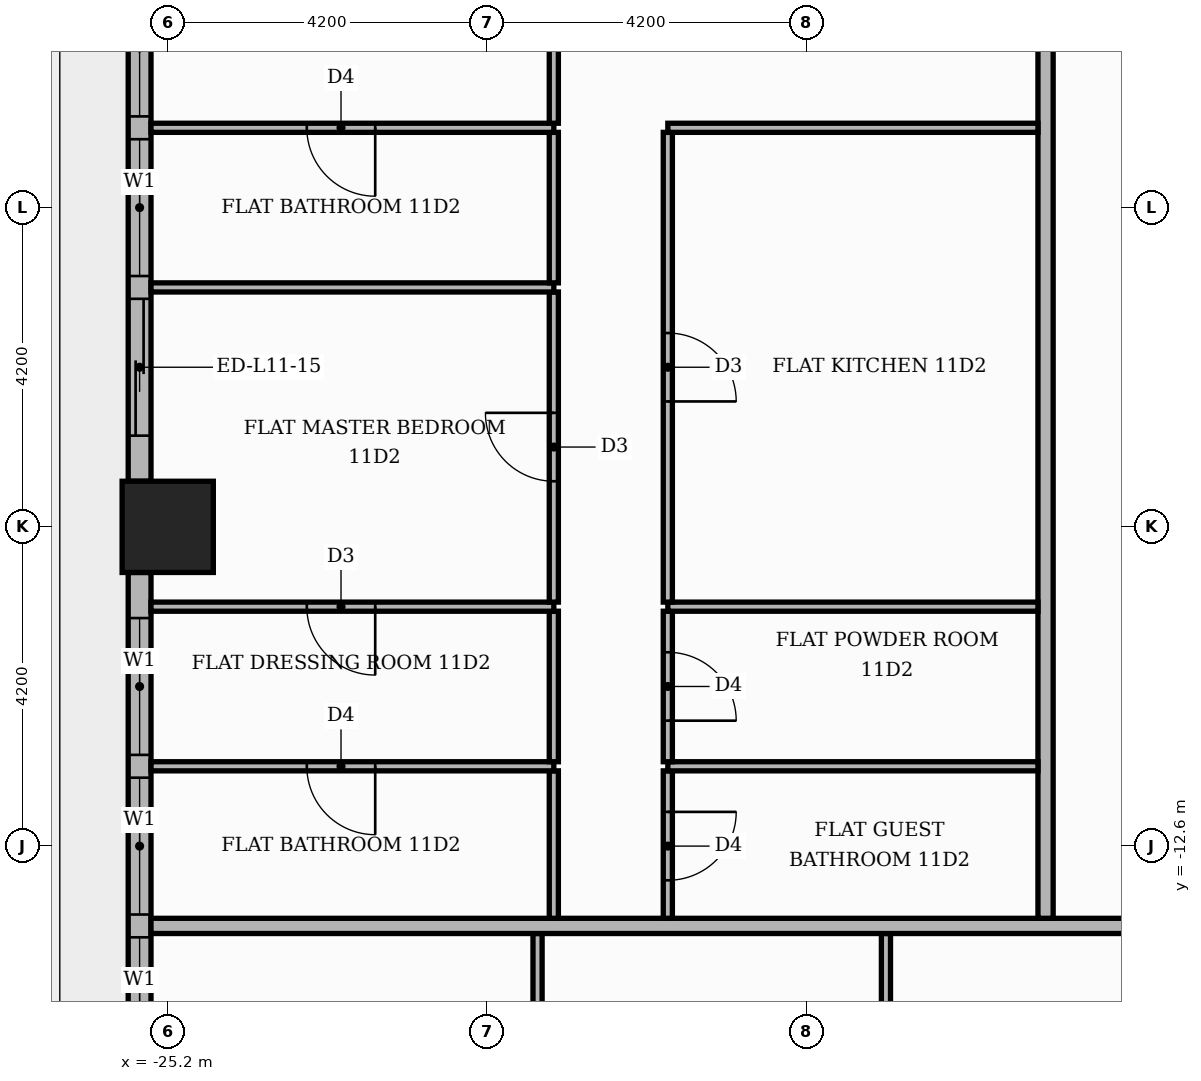
"""IFC4 building model, lengths in metres.
Left out: names, types, materials, properties, quantities, classifications, styles, units other than length and angle.
Written with IfcOpenShell. Run it as: python <this file> out.ifc"""

import sys

from ifc_helpers import new_model, si_unit, direction, frame, frame_2d, origin, origin_2d, place, context, subcontext, project, spatial, rectangle, extrude, element, fill, save


model = new_model("IFC4")
c1 = context("Model", 3, precision=1e-05, world=origin(), true_north=direction((0.0, 1.0)))
c2 = subcontext(c1, "Body", "Model", "MODEL_VIEW")
j1 = project(units=[si_unit("LENGTHUNIT", "METRE"), si_unit("PLANEANGLEUNIT", "RADIAN")], contexts=[c1])
p1 = place(None, origin())
s1 = spatial("IfcSite", under=j1, at=p1, CompositionType="ELEMENT")
p2 = place(p1, origin())
s2 = spatial("IfcBuilding", under=s1, at=p2, CompositionType="ELEMENT")
p3 = place(p2, frame((0.0, 0.0, 50.4)))
s3 = spatial("IfcBuildingStorey", under=s2, at=p3, CompositionType="ELEMENT", Elevation=50.4)
p4 = place(p3, frame((-25.2, -8.4, 0.0), z_axis=(0.0, 0.0, 1.0), x_axis=(1.0, 0.0, 0.0)))
e1 = element("IfcColumn", 1, at=p4, inside=s3, PredefinedType="COLUMN", context=c2, shape_type="SweptSolid", body=[
    extrude(rectangle(XDim=1.2, YDim=1.2, at=origin_2d()), origin(), (0.0, 0.0, 1.0), 3.9),
])
p5 = place(p3, frame((-25.57, -0.6, 0.0), z_axis=(0.0, 0.0, 1.0), x_axis=(0.0, -1.0, 0.0)))
e2 = element("IfcWall", 2, at=p5, inside=s3, PredefinedType="STANDARD", context=c2, shape_type="SweptSolid", body=[
    extrude(rectangle(XDim=7.2, YDim=0.3, at=frame_2d((3.6, 0.0))), origin(), (0.0, 0.0, 1.0), 3.48),
])
p6 = place(p5, frame((0.6, 0.0, 0.9)))
e3 = element("IfcOpeningElement", 3, at=p6, cuts=e2, PredefinedType="OPENING", context=c2, shape_type="SweptSolid", body=[
    extrude(rectangle(XDim=1.8, YDim=2.1, at=frame_2d((0.9, 1.05))), frame((0.0, 0.16, 0.0), z_axis=(0.0, -1.0, 0.0), x_axis=(1.0, 0.0, 0.0)), (0.0, 0.0, 1.0), 0.32),
])
p7 = place(p5, frame((2.7, 0.0, 0.9)))
e4 = element("IfcOpeningElement", 4, at=p7, cuts=e2, PredefinedType="OPENING", context=c2, shape_type="SweptSolid", body=[
    extrude(rectangle(XDim=1.8, YDim=2.1, at=frame_2d((0.9, 1.05))), frame((0.0, 0.16, 0.0), z_axis=(0.0, -1.0, 0.0), x_axis=(1.0, 0.0, 0.0)), (0.0, 0.0, 1.0), 0.32),
])
p8 = place(p5, frame((4.8, 0.0, 0.0)))
e5 = element("IfcOpeningElement", 5, at=p8, cuts=e2, PredefinedType="OPENING", context=c2, shape_type="SweptSolid", body=[
    extrude(rectangle(XDim=1.8, YDim=2.4, at=frame_2d((0.9, 1.2))), frame((0.0, 0.16, 0.0), z_axis=(0.0, -1.0, 0.0), x_axis=(1.0, 0.0, 0.0)), (0.0, 0.0, 1.0), 0.32),
])
p9 = place(p3, frame((-25.57, -9.0, 0.0), z_axis=(0.0, 0.0, 1.0), x_axis=(0.0, -1.0, 0.0)))
e6 = element("IfcWall", 6, at=p9, inside=s3, PredefinedType="STANDARD", context=c2, shape_type="SweptSolid", body=[
    extrude(rectangle(XDim=7.2, YDim=0.3, at=frame_2d((3.6, 0.0))), origin(), (0.0, 0.0, 1.0), 3.48),
])
p10 = place(p9, frame((0.6, 0.0, 0.9)))
e7 = element("IfcOpeningElement", 7, at=p10, cuts=e6, PredefinedType="OPENING", context=c2, shape_type="SweptSolid", body=[
    extrude(rectangle(XDim=1.8, YDim=2.1, at=frame_2d((0.9, 1.05))), frame((0.0, 0.16, 0.0), z_axis=(0.0, -1.0, 0.0), x_axis=(1.0, 0.0, 0.0)), (0.0, 0.0, 1.0), 0.32),
])
p11 = place(p9, frame((2.7, 0.0, 0.9)))
e8 = element("IfcOpeningElement", 8, at=p11, cuts=e6, PredefinedType="OPENING", context=c2, shape_type="SweptSolid", body=[
    extrude(rectangle(XDim=1.8, YDim=2.1, at=frame_2d((0.9, 1.05))), frame((0.0, 0.16, 0.0), z_axis=(0.0, -1.0, 0.0), x_axis=(1.0, 0.0, 0.0)), (0.0, 0.0, 1.0), 0.32),
])
p12 = place(p9, frame((4.8, 0.0, 0.9)))
e9 = element("IfcOpeningElement", 9, at=p12, cuts=e6, PredefinedType="OPENING", context=c2, shape_type="SweptSolid", body=[
    extrude(rectangle(XDim=1.8, YDim=2.1, at=frame_2d((0.9, 1.05))), frame((0.0, 0.16, 0.0), z_axis=(0.0, -1.0, 0.0), x_axis=(1.0, 0.0, 0.0)), (0.0, 0.0, 1.0), 0.32),
])
p13 = place(p3, frame((-20.334, -20.66, 0.0), z_axis=(0.0, 0.0, 1.0), x_axis=(0.0, 1.0, 0.0)))
e10 = element("IfcWall", 10, at=p13, inside=s3, PredefinedType="PARTITIONING", context=c2, shape_type="SweptSolid", body=[
    extrude(rectangle(XDim=6.91, YDim=0.12, at=frame_2d((3.455, 0.0))), origin(), (0.0, 0.0, 1.0), 3.48),
])
p14 = place(p13, frame((4.792, 0.0, 0.0)))
e11 = element("IfcOpeningElement", 11, at=p14, cuts=e10, PredefinedType="OPENING", context=c2, shape_type="SweptSolid", body=[
    extrude(rectangle(XDim=0.9, YDim=2.1, at=frame_2d((0.45, 1.05))), frame((0.0, 0.07, 0.0), z_axis=(0.0, -1.0, 0.0), x_axis=(1.0, 0.0, 0.0)), (0.0, 0.0, 1.0), 0.14),
])
p15 = place(p3, frame((-15.75, -20.66, 0.0), z_axis=(0.0, 0.0, 1.0), x_axis=(0.0, 1.0, 0.0)))
e12 = element("IfcWall", 12, at=p15, inside=s3, PredefinedType="PARTITIONING", context=c2, shape_type="SweptSolid", body=[
    extrude(rectangle(XDim=6.91, YDim=0.12, at=frame_2d((3.455, 0.0))), origin(), (0.0, 0.0, 1.0), 3.48),
])
p16 = place(p15, frame((2.975, 0.0, 0.0)))
e13 = element("IfcOpeningElement", 13, at=p16, cuts=e12, PredefinedType="OPENING", context=c2, shape_type="SweptSolid", body=[
    extrude(rectangle(XDim=1.0, YDim=2.1, at=frame_2d((0.5, 1.05))), frame((0.0, 0.07, 0.0), z_axis=(0.0, -1.0, 0.0), x_axis=(1.0, 0.0, 0.0)), (0.0, 0.0, 1.0), 0.14),
])
p17 = place(p3, frame((-25.42, -13.65, 0.0), z_axis=(0.0, 0.0, 1.0), x_axis=(1.0, 0.0, 0.0)))
e14 = element("IfcWall", 14, at=p17, inside=s3, PredefinedType="PARTITIONING", context=c2, shape_type="SweptSolid", body=[
    extrude(rectangle(XDim=39.07, YDim=0.2, at=frame_2d((19.535, 0.0))), origin(), (0.0, 0.0, 1.0), 3.48),
])
p18 = place(p17, frame((13.32, 0.0, 0.0)))
e15 = element("IfcOpeningElement", 15, at=p18, cuts=e14, PredefinedType="OPENING", context=c2, shape_type="SweptSolid", body=[
    extrude(rectangle(XDim=1.1, YDim=2.4, at=frame_2d((0.55, 1.2))), frame((0.0, 0.11, 0.0), z_axis=(0.0, -1.0, 0.0), x_axis=(1.0, 0.0, 0.0)), (0.0, 0.0, 1.0), 0.22),
])
p19 = place(p17, frame((25.92, 0.0, 0.0)))
e16 = element("IfcOpeningElement", 16, at=p19, cuts=e14, PredefinedType="OPENING", context=c2, shape_type="SweptSolid", body=[
    extrude(rectangle(XDim=1.1, YDim=2.4, at=frame_2d((0.55, 1.2))), frame((0.0, 0.11, 0.0), z_axis=(0.0, -1.0, 0.0), x_axis=(1.0, 0.0, 0.0)), (0.0, 0.0, 1.0), 0.22),
])
p20 = place(p3, frame((-20.12, -13.55, 0.0), z_axis=(0.0, 0.0, 1.0), x_axis=(0.0, 1.0, 0.0)))
e17 = element("IfcWall", 17, at=p20, inside=s3, PredefinedType="PARTITIONING", context=c2, shape_type="SweptSolid", body=[
    extrude(rectangle(XDim=1.94, YDim=0.12, at=frame_2d((0.97, 0.0))), origin(), (0.0, 0.0, 1.0), 3.48),
])
p21 = place(p3, frame((-18.62, -13.55, 0.0), z_axis=(0.0, 0.0, 1.0), x_axis=(0.0, 1.0, 0.0)))
e18 = element("IfcWall", 18, at=p21, inside=s3, PredefinedType="PARTITIONING", context=c2, shape_type="SweptSolid", body=[
    extrude(rectangle(XDim=1.94, YDim=0.12, at=frame_2d((0.97, 0.0))), origin(), (0.0, 0.0, 1.0), 3.48),
])
p22 = place(p21, frame((0.5, 0.0, 0.0)))
e19 = element("IfcOpeningElement", 19, at=p22, cuts=e18, PredefinedType="OPENING", context=c2, shape_type="SweptSolid", body=[
    extrude(rectangle(XDim=0.9, YDim=2.1, at=frame_2d((0.45, 1.05))), frame((0.0, 0.07, 0.0), z_axis=(0.0, -1.0, 0.0), x_axis=(1.0, 0.0, 0.0)), (0.0, 0.0, 1.0), 0.14),
])
p23 = place(p3, frame((-13.65, -13.55, 0.0), z_axis=(0.0, 0.0, 1.0), x_axis=(0.0, 1.0, 0.0)))
e20 = element("IfcWall", 20, at=p23, inside=s3, PredefinedType="PARTITIONING", context=c2, shape_type="SweptSolid", body=[
    extrude(rectangle(XDim=18.7, YDim=0.2, at=frame_2d((9.35, 0.0))), origin(), (0.0, 0.0, 1.0), 3.48),
])
p24 = place(p23, frame((11.95, 0.0, 0.0)))
e21 = element("IfcOpeningElement", 21, at=p24, cuts=e20, PredefinedType="OPENING", context=c2, shape_type="SweptSolid", body=[
    extrude(rectangle(XDim=1.1, YDim=2.4, at=frame_2d((0.55, 1.2))), frame((0.0, 0.11, 0.0), z_axis=(0.0, -1.0, 0.0), x_axis=(1.0, 0.0, 0.0)), (0.0, 0.0, 1.0), 0.22),
])
p25 = place(p3, frame((-25.42, -11.55, 0.0), z_axis=(0.0, 0.0, 1.0), x_axis=(1.0, 0.0, 0.0)))
e22 = element("IfcWall", 22, at=p25, inside=s3, PredefinedType="PARTITIONING", context=c2, shape_type="SweptSolid", body=[
    extrude(rectangle(XDim=5.3, YDim=0.12, at=frame_2d((2.65, 0.0))), origin(), (0.0, 0.0, 1.0), 3.48),
])
p26 = place(p25, frame((2.05, 0.0, 0.0)))
e23 = element("IfcOpeningElement", 23, at=p26, cuts=e22, PredefinedType="OPENING", context=c2, shape_type="SweptSolid", body=[
    extrude(rectangle(XDim=0.9, YDim=2.1, at=frame_2d((0.45, 1.05))), frame((0.0, 0.07, 0.0), z_axis=(0.0, -1.0, 0.0), x_axis=(1.0, 0.0, 0.0)), (0.0, 0.0, 1.0), 0.14),
])
p27 = place(p3, frame((-18.62, -11.55, 0.0), z_axis=(0.0, 0.0, 1.0), x_axis=(1.0, 0.0, 0.0)))
e24 = element("IfcWall", 24, at=p27, inside=s3, PredefinedType="PARTITIONING", context=c2, shape_type="SweptSolid", body=[
    extrude(rectangle(XDim=4.87, YDim=0.12, at=frame_2d((2.435, 0.0))), origin(), (0.0, 0.0, 1.0), 3.48),
])
p28 = place(p3, frame((-20.12, -11.49, 0.0), z_axis=(0.0, 0.0, 1.0), x_axis=(0.0, 1.0, 0.0)))
e25 = element("IfcWall", 25, at=p28, inside=s3, PredefinedType="PARTITIONING", context=c2, shape_type="SweptSolid", body=[
    extrude(rectangle(XDim=1.98, YDim=0.12, at=frame_2d((0.99, 0.0))), origin(), (0.0, 0.0, 1.0), 3.48),
])
p29 = place(p3, frame((-18.62, -11.49, 0.0), z_axis=(0.0, 0.0, 1.0), x_axis=(0.0, 1.0, 0.0)))
e26 = element("IfcWall", 26, at=p29, inside=s3, PredefinedType="PARTITIONING", context=c2, shape_type="SweptSolid", body=[
    extrude(rectangle(XDim=1.98, YDim=0.12, at=frame_2d((0.99, 0.0))), origin(), (0.0, 0.0, 1.0), 3.48),
])
p30 = place(p29, frame((0.54, 0.0, 0.0)))
e27 = element("IfcOpeningElement", 27, at=p30, cuts=e26, PredefinedType="OPENING", context=c2, shape_type="SweptSolid", body=[
    extrude(rectangle(XDim=0.9, YDim=2.1, at=frame_2d((0.45, 1.05))), frame((0.0, 0.07, 0.0), z_axis=(0.0, -1.0, 0.0), x_axis=(1.0, 0.0, 0.0)), (0.0, 0.0, 1.0), 0.14),
])
p31 = place(p3, frame((-25.42, -9.45, 0.0), z_axis=(0.0, 0.0, 1.0), x_axis=(1.0, 0.0, 0.0)))
e28 = element("IfcWall", 28, at=p31, inside=s3, PredefinedType="PARTITIONING", context=c2, shape_type="SweptSolid", body=[
    extrude(rectangle(XDim=5.3, YDim=0.12, at=frame_2d((2.65, 0.0))), origin(), (0.0, 0.0, 1.0), 3.48),
])
p32 = place(p31, frame((2.05, 0.0, 0.0)))
e29 = element("IfcOpeningElement", 29, at=p32, cuts=e28, PredefinedType="OPENING", context=c2, shape_type="SweptSolid", body=[
    extrude(rectangle(XDim=0.9, YDim=2.1, at=frame_2d((0.45, 1.05))), frame((0.0, 0.07, 0.0), z_axis=(0.0, -1.0, 0.0), x_axis=(1.0, 0.0, 0.0)), (0.0, 0.0, 1.0), 0.14),
])
p33 = place(p3, frame((-18.62, -9.45, 0.0), z_axis=(0.0, 0.0, 1.0), x_axis=(1.0, 0.0, 0.0)))
e30 = element("IfcWall", 30, at=p33, inside=s3, PredefinedType="PARTITIONING", context=c2, shape_type="SweptSolid", body=[
    extrude(rectangle(XDim=4.87, YDim=0.12, at=frame_2d((2.435, 0.0))), origin(), (0.0, 0.0, 1.0), 3.48),
])
p34 = place(p3, frame((-20.12, -9.39, 0.0), z_axis=(0.0, 0.0, 1.0), x_axis=(0.0, 1.0, 0.0)))
e31 = element("IfcWall", 31, at=p34, inside=s3, PredefinedType="PARTITIONING", context=c2, shape_type="SweptSolid", body=[
    extrude(rectangle(XDim=4.08, YDim=0.12, at=frame_2d((2.04, 0.0))), origin(), (0.0, 0.0, 1.0), 3.48),
])
p35 = place(p34, frame((1.59, 0.0, 0.0)))
e32 = element("IfcOpeningElement", 32, at=p35, cuts=e31, PredefinedType="OPENING", context=c2, shape_type="SweptSolid", body=[
    extrude(rectangle(XDim=0.9, YDim=2.1, at=frame_2d((0.45, 1.05))), frame((0.0, 0.07, 0.0), z_axis=(0.0, -1.0, 0.0), x_axis=(1.0, 0.0, 0.0)), (0.0, 0.0, 1.0), 0.14),
])
p36 = place(p3, frame((-18.62, -9.39, 0.0), z_axis=(0.0, 0.0, 1.0), x_axis=(0.0, 1.0, 0.0)))
e33 = element("IfcWall", 33, at=p36, inside=s3, PredefinedType="PARTITIONING", context=c2, shape_type="SweptSolid", body=[
    extrude(rectangle(XDim=6.18, YDim=0.12, at=frame_2d((3.09, 0.0))), origin(), (0.0, 0.0, 1.0), 3.48),
])
p37 = place(p36, frame((2.64, 0.0, 0.0)))
e34 = element("IfcOpeningElement", 34, at=p37, cuts=e33, PredefinedType="OPENING", context=c2, shape_type="SweptSolid", body=[
    extrude(rectangle(XDim=0.9, YDim=2.1, at=frame_2d((0.45, 1.05))), frame((0.0, 0.07, 0.0), z_axis=(0.0, -1.0, 0.0), x_axis=(1.0, 0.0, 0.0)), (0.0, 0.0, 1.0), 0.14),
])
p38 = place(p3, frame((-25.42, -5.25, 0.0), z_axis=(0.0, 0.0, 1.0), x_axis=(1.0, 0.0, 0.0)))
e35 = element("IfcWall", 35, at=p38, inside=s3, PredefinedType="PARTITIONING", context=c2, shape_type="SweptSolid", body=[
    extrude(rectangle(XDim=5.3, YDim=0.12, at=frame_2d((2.65, 0.0))), origin(), (0.0, 0.0, 1.0), 3.48),
])
p39 = place(p3, frame((-20.12, -5.19, 0.0), z_axis=(0.0, 0.0, 1.0), x_axis=(0.0, 1.0, 0.0)))
e36 = element("IfcWall", 36, at=p39, inside=s3, PredefinedType="PARTITIONING", context=c2, shape_type="SweptSolid", body=[
    extrude(rectangle(XDim=1.98, YDim=0.12, at=frame_2d((0.99, 0.0))), origin(), (0.0, 0.0, 1.0), 3.48),
])
p40 = place(p3, frame((-25.42, -3.15, 0.0), z_axis=(0.0, 0.0, 1.0), x_axis=(1.0, 0.0, 0.0)))
e37 = element("IfcWall", 37, at=p40, inside=s3, PredefinedType="PARTITIONING", context=c2, shape_type="SweptSolid", body=[
    extrude(rectangle(XDim=5.3, YDim=0.12, at=frame_2d((2.65, 0.0))), origin(), (0.0, 0.0, 1.0), 3.48),
])
p41 = place(p40, frame((2.05, 0.0, 0.0)))
e38 = element("IfcOpeningElement", 38, at=p41, cuts=e37, PredefinedType="OPENING", context=c2, shape_type="SweptSolid", body=[
    extrude(rectangle(XDim=0.9, YDim=2.1, at=frame_2d((0.45, 1.05))), frame((0.0, 0.07, 0.0), z_axis=(0.0, -1.0, 0.0), x_axis=(1.0, 0.0, 0.0)), (0.0, 0.0, 1.0), 0.14),
])
p42 = place(p3, frame((-18.62, -3.15, 0.0), z_axis=(0.0, 0.0, 1.0), x_axis=(1.0, 0.0, 0.0)))
e39 = element("IfcWall", 39, at=p42, inside=s3, PredefinedType="PARTITIONING", context=c2, shape_type="SweptSolid", body=[
    extrude(rectangle(XDim=4.87, YDim=0.12, at=frame_2d((2.435, 0.0))), origin(), (0.0, 0.0, 1.0), 3.48),
])
p43 = place(p3, frame((-20.12, -3.09, 0.0), z_axis=(0.0, 0.0, 1.0), x_axis=(0.0, 1.0, 0.0)))
e40 = element("IfcWall", 40, at=p43, inside=s3, PredefinedType="PARTITIONING", context=c2, shape_type="SweptSolid", body=[
    extrude(rectangle(XDim=4.08, YDim=0.12, at=frame_2d((2.04, 0.0))), origin(), (0.0, 0.0, 1.0), 3.48),
])
p44 = place(p43, frame((1.59, 0.0, 0.0)))
e41 = element("IfcOpeningElement", 41, at=p44, cuts=e40, PredefinedType="OPENING", context=c2, shape_type="SweptSolid", body=[
    extrude(rectangle(XDim=0.9, YDim=2.1, at=frame_2d((0.45, 1.05))), frame((0.0, 0.07, 0.0), z_axis=(0.0, -1.0, 0.0), x_axis=(1.0, 0.0, 0.0)), (0.0, 0.0, 1.0), 0.14),
])
p45 = place(p6, origin())
e42 = element("IfcWindow", 42, at=p45, inside=s3, PartitioningType="SINGLE_PANEL", PredefinedType="WINDOW", context=c2, shape_type="SweptSolid", body=[
    extrude(rectangle(XDim=1.8, YDim=2.1, at=frame_2d((0.9, 1.05))), frame((0.0, 0.03, 0.0), z_axis=(0.0, -1.0, 0.0), x_axis=(1.0, 0.0, 0.0)), (0.0, 0.0, 1.0), 0.06),
])
fill(e3, e42)
p46 = place(p7, origin())
e43 = element("IfcWindow", 43, at=p46, inside=s3, PartitioningType="SINGLE_PANEL", PredefinedType="WINDOW", context=c2, shape_type="SweptSolid", body=[
    extrude(rectangle(XDim=1.8, YDim=2.1, at=frame_2d((0.9, 1.05))), frame((0.0, 0.03, 0.0), z_axis=(0.0, -1.0, 0.0), x_axis=(1.0, 0.0, 0.0)), (0.0, 0.0, 1.0), 0.06),
])
fill(e4, e43)
p47 = place(p8, origin())
e44 = element("IfcDoor", 44, at=p47, inside=s3, OperationType="SLIDING_TO_RIGHT", PredefinedType="DOOR", context=c2, shape_type="SweptSolid", body=[
    extrude(rectangle(XDim=1.8, YDim=2.4, at=frame_2d((0.9, 1.2))), frame((0.0, 0.025, 0.0), z_axis=(0.0, -1.0, 0.0), x_axis=(1.0, 0.0, 0.0)), (0.0, 0.0, 1.0), 0.05),
])
fill(e5, e44)
p48 = place(p10, origin())
e45 = element("IfcWindow", 45, at=p48, inside=s3, PartitioningType="SINGLE_PANEL", PredefinedType="WINDOW", context=c2, shape_type="SweptSolid", body=[
    extrude(rectangle(XDim=1.8, YDim=2.1, at=frame_2d((0.9, 1.05))), frame((0.0, 0.03, 0.0), z_axis=(0.0, -1.0, 0.0), x_axis=(1.0, 0.0, 0.0)), (0.0, 0.0, 1.0), 0.06),
])
fill(e7, e45)
p49 = place(p11, origin())
e46 = element("IfcWindow", 46, at=p49, inside=s3, PartitioningType="SINGLE_PANEL", PredefinedType="WINDOW", context=c2, shape_type="SweptSolid", body=[
    extrude(rectangle(XDim=1.8, YDim=2.1, at=frame_2d((0.9, 1.05))), frame((0.0, 0.03, 0.0), z_axis=(0.0, -1.0, 0.0), x_axis=(1.0, 0.0, 0.0)), (0.0, 0.0, 1.0), 0.06),
])
fill(e8, e46)
p50 = place(p12, origin())
e47 = element("IfcWindow", 47, at=p50, inside=s3, PartitioningType="SINGLE_PANEL", PredefinedType="WINDOW", context=c2, shape_type="SweptSolid", body=[
    extrude(rectangle(XDim=1.8, YDim=2.1, at=frame_2d((0.9, 1.05))), frame((0.0, 0.03, 0.0), z_axis=(0.0, -1.0, 0.0), x_axis=(1.0, 0.0, 0.0)), (0.0, 0.0, 1.0), 0.06),
])
fill(e9, e47)
p51 = place(p37, frame((0.9, 0.0, 0.0), z_axis=(0.0, 0.0, 1.0), x_axis=(-1.0, 0.0, 0.0)))
e48 = element("IfcDoor", 48, at=p51, inside=s3, OperationType="SINGLE_SWING_LEFT", PredefinedType="DOOR", context=c2, shape_type="SweptSolid", body=[
    extrude(rectangle(XDim=0.9, YDim=2.1, at=frame_2d((0.45, 1.05))), frame((0.0, 0.025, 0.0), z_axis=(0.0, -1.0, 0.0), x_axis=(1.0, 0.0, 0.0)), (0.0, 0.0, 1.0), 0.05),
])
fill(e34, e48)
p52 = place(p30, frame((0.9, 0.0, 0.0), z_axis=(0.0, 0.0, 1.0), x_axis=(-1.0, 0.0, 0.0)))
e49 = element("IfcDoor", 49, at=p52, inside=s3, OperationType="SINGLE_SWING_LEFT", PredefinedType="DOOR", context=c2, shape_type="SweptSolid", body=[
    extrude(rectangle(XDim=0.9, YDim=2.1, at=frame_2d((0.45, 1.05))), frame((0.0, 0.025, 0.0), z_axis=(0.0, -1.0, 0.0), x_axis=(1.0, 0.0, 0.0)), (0.0, 0.0, 1.0), 0.05),
])
fill(e27, e49)
p53 = place(p22, frame((0.9, 0.0, 0.0), z_axis=(0.0, 0.0, 1.0), x_axis=(-1.0, 0.0, 0.0)))
e50 = element("IfcDoor", 50, at=p53, inside=s3, OperationType="SINGLE_SWING_RIGHT", PredefinedType="DOOR", context=c2, shape_type="SweptSolid", body=[
    extrude(rectangle(XDim=0.9, YDim=2.1, at=frame_2d((0.45, 1.05))), frame((0.0, 0.025, 0.0), z_axis=(0.0, -1.0, 0.0), x_axis=(1.0, 0.0, 0.0)), (0.0, 0.0, 1.0), 0.05),
])
fill(e19, e50)
p54 = place(p41, frame((0.9, 0.0, 0.0), z_axis=(0.0, 0.0, 1.0), x_axis=(-1.0, 0.0, 0.0)))
e51 = element("IfcDoor", 51, at=p54, inside=s3, OperationType="SINGLE_SWING_RIGHT", PredefinedType="DOOR", context=c2, shape_type="SweptSolid", body=[
    extrude(rectangle(XDim=0.9, YDim=2.1, at=frame_2d((0.45, 1.05))), frame((0.0, 0.025, 0.0), z_axis=(0.0, -1.0, 0.0), x_axis=(1.0, 0.0, 0.0)), (0.0, 0.0, 1.0), 0.05),
])
fill(e38, e51)
p55 = place(p35, origin())
e52 = element("IfcDoor", 52, at=p55, inside=s3, OperationType="SINGLE_SWING_RIGHT", PredefinedType="DOOR", context=c2, shape_type="SweptSolid", body=[
    extrude(rectangle(XDim=0.9, YDim=2.1, at=frame_2d((0.45, 1.05))), frame((0.0, 0.025, 0.0), z_axis=(0.0, -1.0, 0.0), x_axis=(1.0, 0.0, 0.0)), (0.0, 0.0, 1.0), 0.05),
])
fill(e32, e52)
p56 = place(p32, frame((0.9, 0.0, 0.0), z_axis=(0.0, 0.0, 1.0), x_axis=(-1.0, 0.0, 0.0)))
e53 = element("IfcDoor", 53, at=p56, inside=s3, OperationType="SINGLE_SWING_RIGHT", PredefinedType="DOOR", context=c2, shape_type="SweptSolid", body=[
    extrude(rectangle(XDim=0.9, YDim=2.1, at=frame_2d((0.45, 1.05))), frame((0.0, 0.025, 0.0), z_axis=(0.0, -1.0, 0.0), x_axis=(1.0, 0.0, 0.0)), (0.0, 0.0, 1.0), 0.05),
])
fill(e29, e53)
p57 = place(p26, frame((0.9, 0.0, 0.0), z_axis=(0.0, 0.0, 1.0), x_axis=(-1.0, 0.0, 0.0)))
e54 = element("IfcDoor", 54, at=p57, inside=s3, OperationType="SINGLE_SWING_RIGHT", PredefinedType="DOOR", context=c2, shape_type="SweptSolid", body=[
    extrude(rectangle(XDim=0.9, YDim=2.1, at=frame_2d((0.45, 1.05))), frame((0.0, 0.025, 0.0), z_axis=(0.0, -1.0, 0.0), x_axis=(1.0, 0.0, 0.0)), (0.0, 0.0, 1.0), 0.05),
])
fill(e23, e54)
save(model, sys.argv[1])
